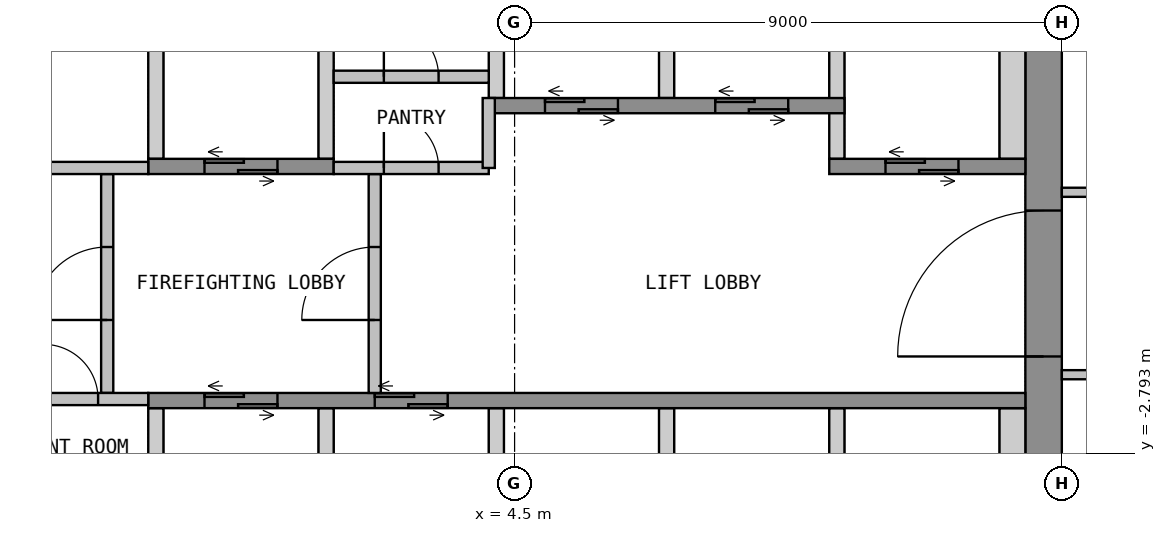
"""IFC4 building model, lengths in metres.
Left out: names, types, materials, properties, quantities, classifications, styles, units other than length and angle.
Written with IfcOpenShell. Run it as: python <this file> out.ifc"""

import sys

from ifc_helpers import new_model, si_unit, direction, frame, frame_2d, origin, place, context, subcontext, project, spatial, polyline, rectangle, outline, extrude, element, fill, save


model = new_model("IFC4")
c1 = context("Model", 3, precision=1e-05, world=origin(), true_north=direction((0.0, 1.0)))
c2 = subcontext(c1, "Body", "Model", "MODEL_VIEW")
j1 = project(units=[si_unit("LENGTHUNIT", "METRE"), si_unit("PLANEANGLEUNIT", "RADIAN")], contexts=[c1])
p1 = place(None, origin())
s1 = spatial("IfcSite", under=j1, at=p1, CompositionType="ELEMENT")
p2 = place(p1, origin())
s2 = spatial("IfcBuilding", under=s1, at=p2, CompositionType="ELEMENT")
p3 = place(p2, frame((0.0, 0.0, 183.9)))
s3 = spatial("IfcBuildingStorey", under=s2, at=p3, CompositionType="ELEMENT", Elevation=183.9)
p4 = place(p3, frame((13.2, -10.65, 0.0), z_axis=(0.0, 0.0, 1.0), x_axis=(0.0, 1.0, 0.0)))
e1 = element("IfcWall", 1, at=p4, inside=s3, PredefinedType="SHEAR", context=c2, shape_type="SweptSolid", body=[
    extrude(rectangle(XDim=21.3, YDim=0.6, at=frame_2d((10.65, 0.0))), origin(), (0.0, 0.0, 1.0), 3.55),
])
p5 = place(p4, frame((9.45, 0.0, 0.0)))
e2 = element("IfcOpeningElement", 2, at=p5, cuts=e1, PredefinedType="OPENING", context=c2, shape_type="SweptSolid", body=[
    extrude(rectangle(XDim=2.4, YDim=2.1, at=frame_2d((1.2, 1.05))), frame((0.0, 0.31, 0.0), z_axis=(0.0, -1.0, 0.0), x_axis=(1.0, 0.0, 0.0)), (0.0, 0.0, 1.0), 0.62),
])
p6 = place(p3, origin())
e3 = element("IfcWall", 3, at=p6, inside=s3, PredefinedType="SHEAR", context=c2, shape_type="SweptSolid", body=[
    extrude(outline(polyline([(-1.525, 2.05), (-1.275, 2.05), (-1.275, 4.75), (-1.525, 4.75), (-1.525, 2.05)])), origin(), (0.0, 0.0, 1.0), 3.55),
])
p7 = place(p3, origin())
e4 = element("IfcWall", 4, at=p7, inside=s3, PredefinedType="SHEAR", context=c2, shape_type="SweptSolid", body=[
    extrude(outline(polyline([(1.275, 2.05), (1.525, 2.05), (1.525, 4.75), (1.275, 4.75), (1.275, 2.05)])), origin(), (0.0, 0.0, 1.0), 3.55),
])
p8 = place(p3, origin())
e5 = element("IfcWall", 5, at=p8, inside=s3, PredefinedType="SHEAR", context=c2, shape_type="SweptSolid", body=[
    extrude(outline(polyline([(9.675, 2.05), (9.925, 2.05), (9.925, 4.75), (9.675, 4.75), (9.675, 2.05)])), origin(), (0.0, 0.0, 1.0), 3.55),
])
p9 = place(p3, origin())
e6 = element("IfcWall", 6, at=p9, inside=s3, PredefinedType="SHEAR", context=c2, shape_type="SweptSolid", body=[
    extrude(outline(polyline([(12.475, 2.05), (12.9, 2.05), (12.9, 4.75), (12.475, 4.75), (12.475, 2.05)])), origin(), (0.0, 0.0, 1.0), 3.55),
])
p10 = place(p3, origin())
e7 = element("IfcWall", 7, at=p10, inside=s3, PredefinedType="SHEAR", context=c2, shape_type="SweptSolid", body=[
    extrude(outline(polyline([(4.075, 3.05), (4.325, 3.05), (4.325, 4.75), (4.075, 4.75), (4.075, 3.05)])), origin(), (0.0, 0.0, 1.0), 3.55),
])
p11 = place(p3, origin())
e8 = element("IfcWall", 8, at=p11, inside=s3, PredefinedType="SHEAR", context=c2, shape_type="SweptSolid", body=[
    extrude(outline(polyline([(6.875, 3.05), (7.125, 3.05), (7.125, 4.75), (6.875, 4.75), (6.875, 3.05)])), origin(), (0.0, 0.0, 1.0), 3.55),
])
p12 = place(p3, frame((-1.525, 1.925, 0.0), z_axis=(0.0, 0.0, 1.0), x_axis=(1.0, 0.0, 0.0)))
e9 = element("IfcWall", 9, at=p12, inside=s3, PredefinedType="SHEAR", context=c2, shape_type="SweptSolid", body=[
    extrude(rectangle(XDim=3.05, YDim=0.25, at=frame_2d((1.525, 0.0))), origin(), (0.0, 0.0, 1.0), 3.55),
])
p13 = place(p12, frame((0.925, 0.0, 0.0)))
e10 = element("IfcOpeningElement", 10, at=p13, cuts=e9, PredefinedType="OPENING", context=c2, shape_type="SweptSolid", body=[
    extrude(rectangle(XDim=1.2, YDim=2.1, at=frame_2d((0.6, 1.05))), frame((0.0, 0.135, 0.0), z_axis=(0.0, -1.0, 0.0), x_axis=(1.0, 0.0, 0.0)), (0.0, 0.0, 1.0), 0.27),
])
p14 = place(p3, frame((4.075, 2.925, 0.0), z_axis=(0.0, 0.0, 1.0), x_axis=(1.0, 0.0, 0.0)))
e11 = element("IfcWall", 11, at=p14, inside=s3, PredefinedType="SHEAR", context=c2, shape_type="SweptSolid", body=[
    extrude(rectangle(XDim=5.85, YDim=0.25, at=frame_2d((2.925, 0.0))), origin(), (0.0, 0.0, 1.0), 3.55),
])
p15 = place(p14, frame((0.925, 0.0, 0.0)))
e12 = element("IfcOpeningElement", 12, at=p15, cuts=e11, PredefinedType="OPENING", context=c2, shape_type="SweptSolid", body=[
    extrude(rectangle(XDim=1.2, YDim=2.1, at=frame_2d((0.6, 1.05))), frame((0.0, 0.135, 0.0), z_axis=(0.0, -1.0, 0.0), x_axis=(1.0, 0.0, 0.0)), (0.0, 0.0, 1.0), 0.27),
])
p16 = place(p14, frame((3.725, 0.0, 0.0)))
e13 = element("IfcOpeningElement", 13, at=p16, cuts=e11, PredefinedType="OPENING", context=c2, shape_type="SweptSolid", body=[
    extrude(rectangle(XDim=1.2, YDim=2.1, at=frame_2d((0.6, 1.05))), frame((0.0, 0.135, 0.0), z_axis=(0.0, -1.0, 0.0), x_axis=(1.0, 0.0, 0.0)), (0.0, 0.0, 1.0), 0.27),
])
p17 = place(p3, frame((9.675, 1.925, 0.0), z_axis=(0.0, 0.0, 1.0), x_axis=(1.0, 0.0, 0.0)))
e14 = element("IfcWall", 14, at=p17, inside=s3, PredefinedType="SHEAR", context=c2, shape_type="SweptSolid", body=[
    extrude(rectangle(XDim=3.225, YDim=0.25, at=frame_2d((1.612, 0.0))), origin(), (0.0, 0.0, 1.0), 3.55),
])
p18 = place(p17, frame((0.925, 0.0, 0.0)))
e15 = element("IfcOpeningElement", 15, at=p18, cuts=e14, PredefinedType="OPENING", context=c2, shape_type="SweptSolid", body=[
    extrude(rectangle(XDim=1.2, YDim=2.1, at=frame_2d((0.6, 1.05))), frame((0.0, 0.135, 0.0), z_axis=(0.0, -1.0, 0.0), x_axis=(1.0, 0.0, 0.0)), (0.0, 0.0, 1.0), 0.27),
])
p19 = place(p3, origin())
e16 = element("IfcWall", 16, at=p19, inside=s3, PredefinedType="SHEAR", context=c2, shape_type="SweptSolid", body=[
    extrude(outline(polyline([(-1.525, -4.75), (-1.275, -4.75), (-1.275, -2.05), (-1.525, -2.05), (-1.525, -4.75)])), origin(), (0.0, 0.0, 1.0), 3.55),
])
p20 = place(p3, origin())
e17 = element("IfcWall", 17, at=p20, inside=s3, PredefinedType="SHEAR", context=c2, shape_type="SweptSolid", body=[
    extrude(outline(polyline([(1.275, -4.75), (1.525, -4.75), (1.525, -2.05), (1.275, -2.05), (1.275, -4.75)])), origin(), (0.0, 0.0, 1.0), 3.55),
])
p21 = place(p3, origin())
e18 = element("IfcWall", 18, at=p21, inside=s3, PredefinedType="SHEAR", context=c2, shape_type="SweptSolid", body=[
    extrude(outline(polyline([(4.075, -4.75), (4.325, -4.75), (4.325, -2.05), (4.075, -2.05), (4.075, -4.75)])), origin(), (0.0, 0.0, 1.0), 3.55),
])
p22 = place(p3, origin())
e19 = element("IfcWall", 19, at=p22, inside=s3, PredefinedType="SHEAR", context=c2, shape_type="SweptSolid", body=[
    extrude(outline(polyline([(6.875, -4.75), (7.125, -4.75), (7.125, -2.05), (6.875, -2.05), (6.875, -4.75)])), origin(), (0.0, 0.0, 1.0), 3.55),
])
p23 = place(p3, origin())
e20 = element("IfcWall", 20, at=p23, inside=s3, PredefinedType="SHEAR", context=c2, shape_type="SweptSolid", body=[
    extrude(outline(polyline([(9.675, -4.75), (9.925, -4.75), (9.925, -2.05), (9.675, -2.05), (9.675, -4.75)])), origin(), (0.0, 0.0, 1.0), 3.55),
])
p24 = place(p3, origin())
e21 = element("IfcWall", 21, at=p24, inside=s3, PredefinedType="SHEAR", context=c2, shape_type="SweptSolid", body=[
    extrude(outline(polyline([(12.475, -4.75), (12.9, -4.75), (12.9, -2.05), (12.475, -2.05), (12.475, -4.75)])), origin(), (0.0, 0.0, 1.0), 3.55),
])
p25 = place(p3, frame((-1.525, -1.925, 0.0), z_axis=(0.0, 0.0, 1.0), x_axis=(1.0, 0.0, 0.0)))
e22 = element("IfcWall", 22, at=p25, inside=s3, PredefinedType="SHEAR", context=c2, shape_type="SweptSolid", body=[
    extrude(rectangle(XDim=14.425, YDim=0.25, at=frame_2d((7.212, 0.0))), origin(), (0.0, 0.0, 1.0), 3.55),
])
p26 = place(p25, frame((0.925, 0.0, 0.0)))
e23 = element("IfcOpeningElement", 23, at=p26, cuts=e22, PredefinedType="OPENING", context=c2, shape_type="SweptSolid", body=[
    extrude(rectangle(XDim=1.2, YDim=2.1, at=frame_2d((0.6, 1.05))), frame((0.0, 0.135, 0.0), z_axis=(0.0, -1.0, 0.0), x_axis=(1.0, 0.0, 0.0)), (0.0, 0.0, 1.0), 0.27),
])
p27 = place(p25, frame((3.725, 0.0, 0.0)))
e24 = element("IfcOpeningElement", 24, at=p27, cuts=e22, PredefinedType="OPENING", context=c2, shape_type="SweptSolid", body=[
    extrude(rectangle(XDim=1.2, YDim=2.1, at=frame_2d((0.6, 1.05))), frame((0.0, 0.135, 0.0), z_axis=(0.0, -1.0, 0.0), x_axis=(1.0, 0.0, 0.0)), (0.0, 0.0, 1.0), 0.27),
])
p28 = place(p3, frame((-2.2, -1.8, 0.0), z_axis=(0.0, 0.0, 1.0), x_axis=(0.0, 1.0, 0.0)))
e25 = element("IfcWall", 25, at=p28, inside=s3, PredefinedType="PARTITIONING", context=c2, shape_type="SweptSolid", body=[
    extrude(rectangle(XDim=3.6, YDim=0.2, at=frame_2d((1.8, 0.0))), origin(), (0.0, 0.0, 1.0), 3.55),
])
p29 = place(p28, frame((1.2, 0.0, 0.0)))
e26 = element("IfcOpeningElement", 26, at=p29, cuts=e25, PredefinedType="OPENING", context=c2, shape_type="SweptSolid", body=[
    extrude(rectangle(XDim=1.2, YDim=2.1, at=frame_2d((0.6, 1.05))), frame((0.0, 0.11, 0.0), z_axis=(0.0, -1.0, 0.0), x_axis=(1.0, 0.0, 0.0)), (0.0, 0.0, 1.0), 0.22),
])
p30 = place(p3, frame((2.2, -1.8, 0.0), z_axis=(0.0, 0.0, 1.0), x_axis=(0.0, 1.0, 0.0)))
e27 = element("IfcWall", 27, at=p30, inside=s3, PredefinedType="PARTITIONING", context=c2, shape_type="SweptSolid", body=[
    extrude(rectangle(XDim=3.6, YDim=0.2, at=frame_2d((1.8, 0.0))), origin(), (0.0, 0.0, 1.0), 3.55),
])
p31 = place(p30, frame((1.2, 0.0, 0.0)))
e28 = element("IfcOpeningElement", 28, at=p31, cuts=e27, PredefinedType="OPENING", context=c2, shape_type="SweptSolid", body=[
    extrude(rectangle(XDim=1.2, YDim=2.1, at=frame_2d((0.6, 1.05))), frame((0.0, 0.11, 0.0), z_axis=(0.0, -1.0, 0.0), x_axis=(1.0, 0.0, 0.0)), (0.0, 0.0, 1.0), 0.22),
])
p32 = place(p3, frame((-12.9, 1.9, 0.0), z_axis=(0.0, 0.0, 1.0), x_axis=(1.0, 0.0, 0.0)))
e29 = element("IfcWall", 29, at=p32, inside=s3, PredefinedType="PARTITIONING", context=c2, shape_type="SweptSolid", body=[
    extrude(rectangle(XDim=11.375, YDim=0.2, at=frame_2d((5.688, 0.0))), origin(), (0.0, 0.0, 1.0), 3.55),
])
p33 = place(p32, frame((2.244, 0.0, 0.0)))
e30 = element("IfcOpeningElement", 30, at=p33, cuts=e29, PredefinedType="OPENING", context=c2, shape_type="SweptSolid", body=[
    extrude(rectangle(XDim=1.2, YDim=2.1, at=frame_2d((0.6, 1.05))), frame((0.0, 0.11, 0.0), z_axis=(0.0, -1.0, 0.0), x_axis=(1.0, 0.0, 0.0)), (0.0, 0.0, 1.0), 0.22),
])
p34 = place(p32, frame((7.931, 0.0, 0.0)))
e31 = element("IfcOpeningElement", 31, at=p34, cuts=e29, PredefinedType="OPENING", context=c2, shape_type="SweptSolid", body=[
    extrude(rectangle(XDim=1.2, YDim=2.1, at=frame_2d((0.6, 1.05))), frame((0.0, 0.11, 0.0), z_axis=(0.0, -1.0, 0.0), x_axis=(1.0, 0.0, 0.0)), (0.0, 0.0, 1.0), 0.22),
])
p35 = place(p3, frame((1.525, 3.4, 0.0), z_axis=(0.0, 0.0, 1.0), x_axis=(1.0, 0.0, 0.0)))
e32 = element("IfcWall", 32, at=p35, inside=s3, PredefinedType="PARTITIONING", context=c2, shape_type="SweptSolid", body=[
    extrude(rectangle(XDim=2.55, YDim=0.2, at=frame_2d((1.275, 0.0))), origin(), (0.0, 0.0, 1.0), 3.55),
])
p36 = place(p35, frame((0.825, 0.0, 0.0)))
e33 = element("IfcOpeningElement", 33, at=p36, cuts=e32, PredefinedType="OPENING", context=c2, shape_type="SweptSolid", body=[
    extrude(rectangle(XDim=0.9, YDim=2.1, at=frame_2d((0.45, 1.05))), frame((0.0, 0.11, 0.0), z_axis=(0.0, -1.0, 0.0), x_axis=(1.0, 0.0, 0.0)), (0.0, 0.0, 1.0), 0.22),
])
p37 = place(p3, frame((1.525, 1.9, 0.0), z_axis=(0.0, 0.0, 1.0), x_axis=(1.0, 0.0, 0.0)))
e34 = element("IfcWall", 34, at=p37, inside=s3, PredefinedType="PARTITIONING", context=c2, shape_type="SweptSolid", body=[
    extrude(rectangle(XDim=2.55, YDim=0.2, at=frame_2d((1.275, 0.0))), origin(), (0.0, 0.0, 1.0), 3.55),
])
p38 = place(p37, frame((0.825, 0.0, 0.0)))
e35 = element("IfcOpeningElement", 35, at=p38, cuts=e34, PredefinedType="OPENING", context=c2, shape_type="SweptSolid", body=[
    extrude(rectangle(XDim=0.9, YDim=2.1, at=frame_2d((0.45, 1.05))), frame((0.0, 0.11, 0.0), z_axis=(0.0, -1.0, 0.0), x_axis=(1.0, 0.0, 0.0)), (0.0, 0.0, 1.0), 0.22),
])
p39 = place(p3, frame((4.075, 1.9, 0.0), z_axis=(0.0, 0.0, 1.0), x_axis=(0.0, 1.0, 0.0)))
e36 = element("IfcWall", 36, at=p39, inside=s3, PredefinedType="PARTITIONING", context=c2, shape_type="SweptSolid", body=[
    extrude(rectangle(XDim=1.15, YDim=0.2, at=frame_2d((0.575, 0.0))), origin(), (0.0, 0.0, 1.0), 3.55),
])
p40 = place(p3, frame((-4.075, -1.9, 0.0), z_axis=(0.0, 0.0, 1.0), x_axis=(1.0, 0.0, 0.0)))
e37 = element("IfcWall", 37, at=p40, inside=s3, PredefinedType="PARTITIONING", context=c2, shape_type="SweptSolid", body=[
    extrude(rectangle(XDim=2.55, YDim=0.2, at=frame_2d((1.275, 0.0))), origin(), (0.0, 0.0, 1.0), 3.55),
])
p41 = place(p40, frame((0.825, 0.0, 0.0)))
e38 = element("IfcOpeningElement", 38, at=p41, cuts=e37, PredefinedType="OPENING", context=c2, shape_type="SweptSolid", body=[
    extrude(rectangle(XDim=0.9, YDim=2.1, at=frame_2d((0.45, 1.05))), frame((0.0, 0.11, 0.0), z_axis=(0.0, -1.0, 0.0), x_axis=(1.0, 0.0, 0.0)), (0.0, 0.0, 1.0), 0.22),
])
for number, where, z_axis, x_axis in (
    (39, (13.5, -1.5, 0.0), (0.0, 0.0, 1.0), (1.0, 0.0, 0.0)),
    (40, (16.575, 1.5, 0.0), (0.0, 0.0, 1.0), (-1.0, 0.0, 0.0)),
):
    element("IfcWall", number, at=place(p3, frame(where, z_axis=z_axis, x_axis=x_axis)), inside=s3, PredefinedType="PARTITIONING", context=c2, shape_type="SweptSolid", body=[
        extrude(rectangle(XDim=3.075, YDim=0.15, at=frame_2d((1.538, 0.0))), origin(), (0.0, 0.0, 1.0), 3.55),
    ])
p42 = place(p5, origin())
e41 = element("IfcDoor", 41, at=p42, inside=s3, OperationType="DOUBLE_DOOR_DOUBLE_SWING", PredefinedType="DOOR", context=c2, shape_type="SweptSolid", body=[
    extrude(rectangle(XDim=2.4, YDim=2.1, at=frame_2d((1.2, 1.05))), frame((0.0, 0.025, 0.0), z_axis=(0.0, -1.0, 0.0), x_axis=(1.0, 0.0, 0.0)), (0.0, 0.0, 1.0), 0.05),
])
fill(e2, e41)
p43 = place(p13, origin())
e42 = element("IfcDoor", 42, at=p43, inside=s3, OperationType="DOUBLE_DOOR_SLIDING", PredefinedType="DOOR", context=c2, shape_type="SweptSolid", body=[
    extrude(rectangle(XDim=1.2, YDim=2.1, at=frame_2d((0.6, 1.05))), frame((0.0, 0.025, 0.0), z_axis=(0.0, -1.0, 0.0), x_axis=(1.0, 0.0, 0.0)), (0.0, 0.0, 1.0), 0.05),
])
fill(e10, e42)
p44 = place(p15, origin())
e43 = element("IfcDoor", 43, at=p44, inside=s3, OperationType="DOUBLE_DOOR_SLIDING", PredefinedType="DOOR", context=c2, shape_type="SweptSolid", body=[
    extrude(rectangle(XDim=1.2, YDim=2.1, at=frame_2d((0.6, 1.05))), frame((0.0, 0.025, 0.0), z_axis=(0.0, -1.0, 0.0), x_axis=(1.0, 0.0, 0.0)), (0.0, 0.0, 1.0), 0.05),
])
fill(e12, e43)
p45 = place(p16, origin())
e44 = element("IfcDoor", 44, at=p45, inside=s3, OperationType="DOUBLE_DOOR_SLIDING", PredefinedType="DOOR", context=c2, shape_type="SweptSolid", body=[
    extrude(rectangle(XDim=1.2, YDim=2.1, at=frame_2d((0.6, 1.05))), frame((0.0, 0.025, 0.0), z_axis=(0.0, -1.0, 0.0), x_axis=(1.0, 0.0, 0.0)), (0.0, 0.0, 1.0), 0.05),
])
fill(e13, e44)
p46 = place(p18, origin())
e45 = element("IfcDoor", 45, at=p46, inside=s3, OperationType="DOUBLE_DOOR_SLIDING", PredefinedType="DOOR", context=c2, shape_type="SweptSolid", body=[
    extrude(rectangle(XDim=1.2, YDim=2.1, at=frame_2d((0.6, 1.05))), frame((0.0, 0.025, 0.0), z_axis=(0.0, -1.0, 0.0), x_axis=(1.0, 0.0, 0.0)), (0.0, 0.0, 1.0), 0.05),
])
fill(e15, e45)
p47 = place(p26, origin())
e46 = element("IfcDoor", 46, at=p47, inside=s3, OperationType="DOUBLE_DOOR_SLIDING", PredefinedType="DOOR", context=c2, shape_type="SweptSolid", body=[
    extrude(rectangle(XDim=1.2, YDim=2.1, at=frame_2d((0.6, 1.05))), frame((0.0, 0.025, 0.0), z_axis=(0.0, -1.0, 0.0), x_axis=(1.0, 0.0, 0.0)), (0.0, 0.0, 1.0), 0.05),
])
fill(e23, e46)
p48 = place(p27, origin())
e47 = element("IfcDoor", 47, at=p48, inside=s3, OperationType="DOUBLE_DOOR_SLIDING", PredefinedType="DOOR", context=c2, shape_type="SweptSolid", body=[
    extrude(rectangle(XDim=1.2, YDim=2.1, at=frame_2d((0.6, 1.05))), frame((0.0, 0.025, 0.0), z_axis=(0.0, -1.0, 0.0), x_axis=(1.0, 0.0, 0.0)), (0.0, 0.0, 1.0), 0.05),
])
fill(e24, e47)
p49 = place(p29, origin())
e48 = element("IfcDoor", 48, at=p49, inside=s3, OperationType="SINGLE_SWING_LEFT", PredefinedType="DOOR", context=c2, shape_type="SweptSolid", body=[
    extrude(rectangle(XDim=1.2, YDim=2.1, at=frame_2d((0.6, 1.05))), frame((0.0, 0.025, 0.0), z_axis=(0.0, -1.0, 0.0), x_axis=(1.0, 0.0, 0.0)), (0.0, 0.0, 1.0), 0.05),
])
fill(e26, e48)
p50 = place(p31, origin())
e49 = element("IfcDoor", 49, at=p50, inside=s3, OperationType="SINGLE_SWING_LEFT", PredefinedType="DOOR", context=c2, shape_type="SweptSolid", body=[
    extrude(rectangle(XDim=1.2, YDim=2.1, at=frame_2d((0.6, 1.05))), frame((0.0, 0.025, 0.0), z_axis=(0.0, -1.0, 0.0), x_axis=(1.0, 0.0, 0.0)), (0.0, 0.0, 1.0), 0.05),
])
fill(e28, e49)
p51 = place(p36, origin())
e50 = element("IfcDoor", 50, at=p51, inside=s3, OperationType="SINGLE_SWING_LEFT", PredefinedType="DOOR", context=c2, shape_type="SweptSolid", body=[
    extrude(rectangle(XDim=0.9, YDim=2.1, at=frame_2d((0.45, 1.05))), frame((0.0, 0.025, 0.0), z_axis=(0.0, -1.0, 0.0), x_axis=(1.0, 0.0, 0.0)), (0.0, 0.0, 1.0), 0.05),
])
fill(e33, e50)
p52 = place(p38, origin())
e51 = element("IfcDoor", 51, at=p52, inside=s3, OperationType="SINGLE_SWING_LEFT", PredefinedType="DOOR", context=c2, shape_type="SweptSolid", body=[
    extrude(rectangle(XDim=0.9, YDim=2.1, at=frame_2d((0.45, 1.05))), frame((0.0, 0.025, 0.0), z_axis=(0.0, -1.0, 0.0), x_axis=(1.0, 0.0, 0.0)), (0.0, 0.0, 1.0), 0.05),
])
fill(e35, e51)
p53 = place(p41, origin())
e52 = element("IfcDoor", 52, at=p53, inside=s3, OperationType="SINGLE_SWING_LEFT", PredefinedType="DOOR", context=c2, shape_type="SweptSolid", body=[
    extrude(rectangle(XDim=0.9, YDim=2.1, at=frame_2d((0.45, 1.05))), frame((0.0, 0.025, 0.0), z_axis=(0.0, -1.0, 0.0), x_axis=(1.0, 0.0, 0.0)), (0.0, 0.0, 1.0), 0.05),
])
fill(e38, e52)
save(model, sys.argv[1])
